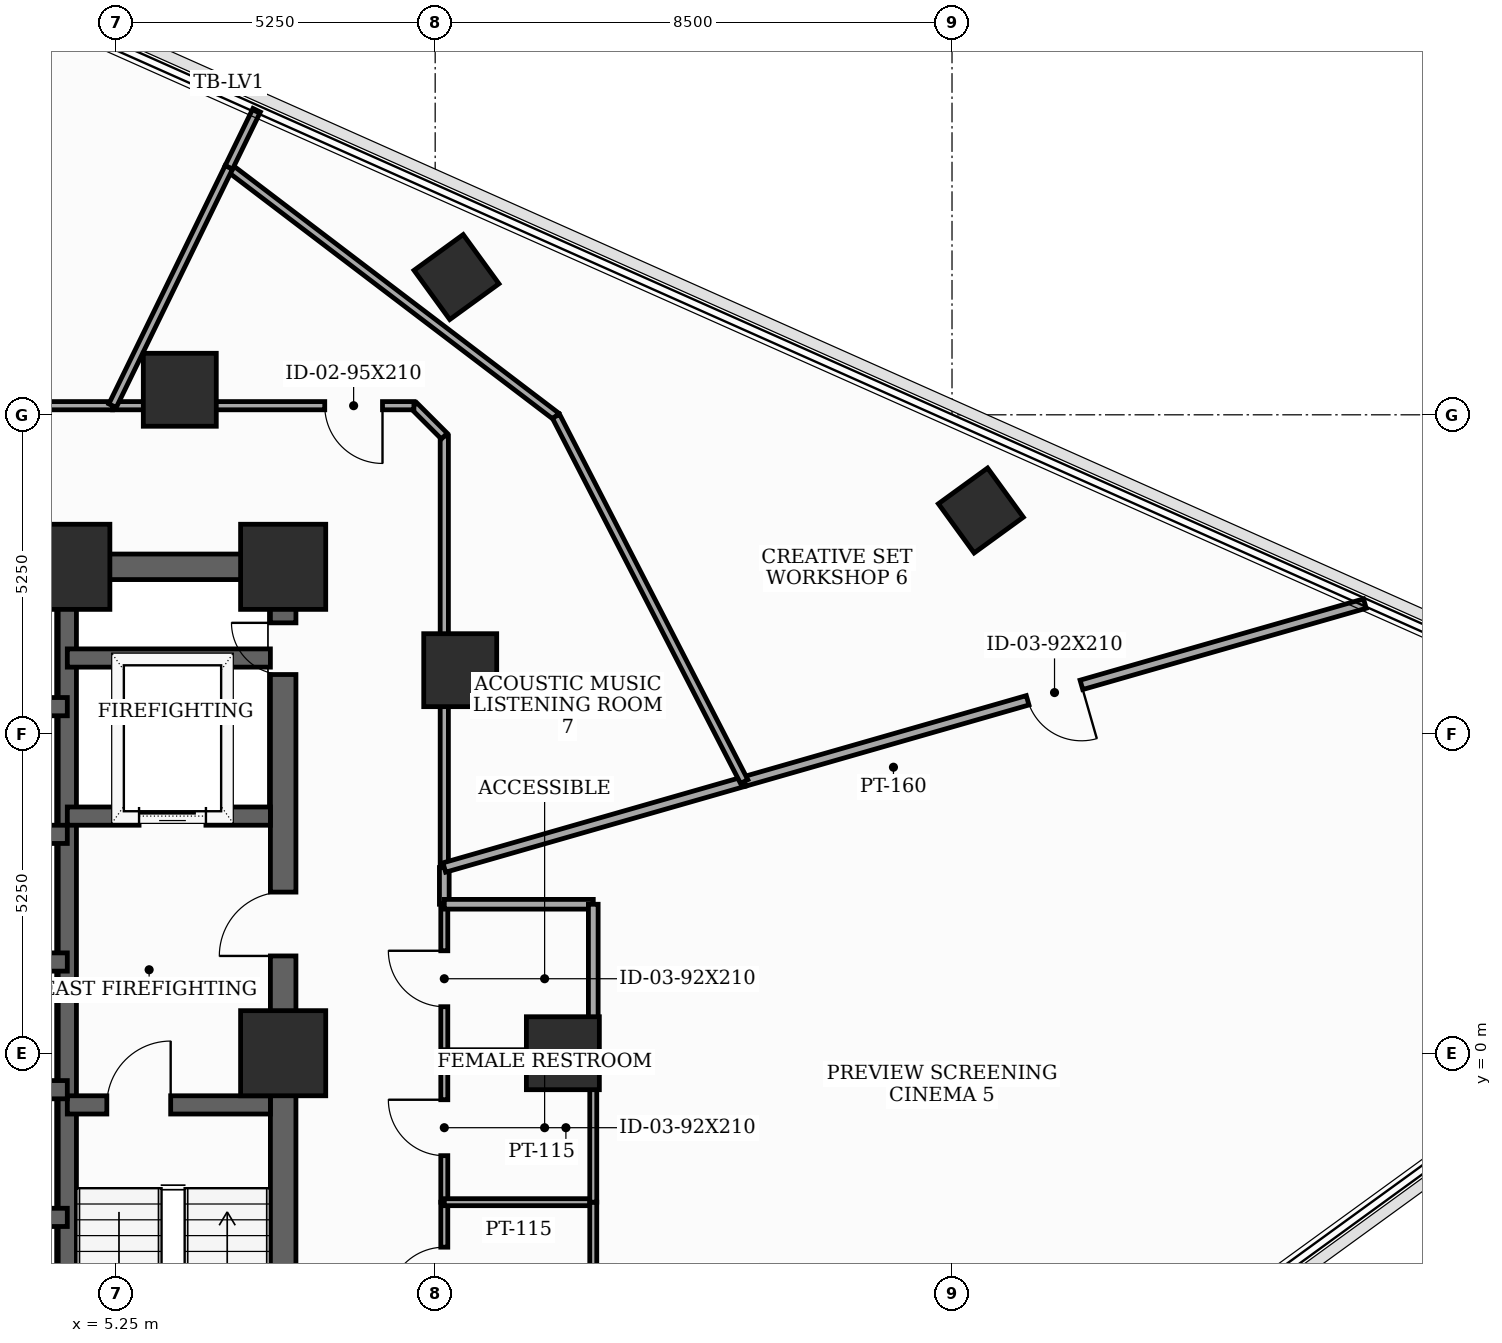
"""IFC4 building model, lengths in metres.
Left out: names, types, materials, properties, quantities, classifications, styles, units other than length and angle.
Written with IfcOpenShell. Run it as: python <this file> out.ifc"""

import sys

from ifc_helpers import new_model, si_unit, direction, frame, frame_2d, origin, origin_2d, place, context, subcontext, project, spatial, rectangle, extrude, element, fill, save


model = new_model("IFC4")
c1 = context("Model", 3, precision=1e-05, world=origin(), true_north=direction((0.0, 1.0)))
c2 = subcontext(c1, "Body", "Model", "MODEL_VIEW")
j1 = project(units=[si_unit("LENGTHUNIT", "METRE"), si_unit("PLANEANGLEUNIT", "RADIAN")], contexts=[c1])
p1 = place(None, origin())
s1 = spatial("IfcSite", under=j1, at=p1, CompositionType="ELEMENT")
p2 = place(p1, origin())
s2 = spatial("IfcBuilding", under=s1, at=p2, CompositionType="ELEMENT")
p3 = place(p2, frame((0.0, 0.0, 154.6)))
s3 = spatial("IfcBuildingStorey", under=s2, at=p3, CompositionType="ELEMENT", Elevation=154.6)
for number, where, z_axis, x_axis in (
    (1, (8.0, 0.0, 0.0), (0.0, 0.0, 1.0), (1.0, 0.0, 0.0)),
    (2, (8.0, 8.0, 0.0), (0.0, 0.0, 1.0), (1.0, 0.0, 0.0)),
    (3, (4.45, 8.0, 0.0), (0.0, 0.0, 1.0), (1.0, 0.0, 0.0)),
):
    element("IfcColumn", number, at=place(p3, frame(where, z_axis=z_axis, x_axis=x_axis)), inside=s3, PredefinedType="COLUMN", context=c2, shape_type="SweptSolid", body=[
        extrude(rectangle(XDim=1.4, YDim=1.4, at=origin_2d()), origin(), (0.0, 0.0, 1.0), 3.7),
    ])
for number, where, z_axis, x_axis in (
    (4, (12.6, 0.0, 0.0), (0.0, 0.0, 1.0), (1.0, 0.0, 0.0)),
    (5, (10.912, 6.3, 0.0), (0.0, 0.0, 1.0), (1.0, 0.0, 0.0)),
    (6, (6.3, 10.912, 0.0), (0.0, 0.0, 1.0), (1.0, 0.0, 0.0)),
):
    element("IfcColumn", number, at=place(p3, frame(where, z_axis=z_axis, x_axis=x_axis)), inside=s3, PredefinedType="COLUMN", context=c2, shape_type="SweptSolid", body=[
        extrude(rectangle(XDim=1.2, YDim=1.2, at=origin_2d()), origin(), (0.0, 0.0, 1.0), 3.7),
    ])
for number, where, z_axis, x_axis in (
    (7, (19.474, 8.926, 0.0), (0.0, 0.0, 1.0), (0.809, 0.588, 0.0)),
    (8, (10.85, 12.766, 0.0), (0.0, 0.0, 1.0), (0.809, 0.588, 0.0)),
):
    element("IfcColumn", number, at=place(p3, frame(where, z_axis=z_axis, x_axis=x_axis)), inside=s3, PredefinedType="COLUMN", context=c2, shape_type="SweptSolid", body=[
        extrude(rectangle(XDim=1.0, YDim=1.0, at=origin_2d()), origin(), (0.0, 0.0, 1.0), 3.7),
    ])
p4 = place(p3, frame((8.0, -8.0, 0.0), z_axis=(0.0, 0.0, 1.0), x_axis=(0.0, 1.0, 0.0)))
e9 = element("IfcWall", 9, at=p4, inside=s3, PredefinedType="SHEAR", context=c2, shape_type="SweptSolid", body=[
    extrude(rectangle(XDim=16.0, YDim=0.42, at=frame_2d((8.0, 0.0))), origin(), (0.0, 0.0, 1.0), 3.5),
])
p5 = place(p4, frame((9.6, 0.0, 0.0)))
e10 = element("IfcOpeningElement", 10, at=p5, cuts=e9, PredefinedType="OPENING", context=c2, shape_type="SweptSolid", body=[
    extrude(rectangle(XDim=1.05, YDim=2.15, at=frame_2d((0.525, 1.075))), frame((0.0, 0.22, 0.0), z_axis=(0.0, -1.0, 0.0), x_axis=(1.0, 0.0, 0.0)), (0.0, 0.0, 1.0), 0.44),
])
p6 = place(p4, frame((14.229, 0.0, 0.0)))
e11 = element("IfcOpeningElement", 11, at=p6, cuts=e9, PredefinedType="OPENING", context=c2, shape_type="SweptSolid", body=[
    extrude(rectangle(XDim=0.85, YDim=2.02, at=frame_2d((0.425, 1.01))), frame((0.0, 0.22, 0.0), z_axis=(0.0, -1.0, 0.0), x_axis=(1.0, 0.0, 0.0)), (0.0, 0.0, 1.0), 0.44),
])
p7 = place(p3, frame((-8.0, 8.0, 0.0), z_axis=(0.0, 0.0, 1.0), x_axis=(1.0, 0.0, 0.0)))
e12 = element("IfcWall", 12, at=p7, inside=s3, PredefinedType="SHEAR", context=c2, shape_type="SweptSolid", body=[
    extrude(rectangle(XDim=16.0, YDim=0.42, at=frame_2d((8.0, 0.0))), origin(), (0.0, 0.0, 1.0), 3.5),
])
p8 = place(p7, frame((7.1, 0.0, 0.0)))
e13 = element("IfcOpeningElement", 13, at=p8, cuts=e12, PredefinedType="OPENING", context=c2, shape_type="SweptSolid", body=[
    extrude(rectangle(XDim=1.8, YDim=2.15, at=frame_2d((0.9, 1.075))), frame((0.0, 0.22, 0.0), z_axis=(0.0, -1.0, 0.0), x_axis=(1.0, 0.0, 0.0)), (0.0, 0.0, 1.0), 0.44),
])
p9 = place(p3, frame((4.45, -7.79, 0.0), z_axis=(0.0, 0.0, 1.0), x_axis=(0.0, 1.0, 0.0)))
e14 = element("IfcWall", 14, at=p9, inside=s3, PredefinedType="SHEAR", context=c2, shape_type="SweptSolid", body=[
    extrude(rectangle(XDim=15.58, YDim=0.3, at=frame_2d((7.79, 0.0))), origin(), (0.0, 0.0, 1.0), 3.5),
])
p10 = place(p3, frame((4.45, -0.85, 0.0), z_axis=(0.0, 0.0, 1.0), x_axis=(1.0, 0.0, 0.0)))
e15 = element("IfcWall", 15, at=p10, inside=s3, PredefinedType="SHEAR", context=c2, shape_type="SweptSolid", body=[
    extrude(rectangle(XDim=3.34, YDim=0.3, at=frame_2d((1.67, 0.0))), origin(), (0.0, 0.0, 1.0), 3.5),
])
p11 = place(p10, frame((0.65, 0.0, 0.0)))
e16 = element("IfcOpeningElement", 16, at=p11, cuts=e15, PredefinedType="OPENING", context=c2, shape_type="SweptSolid", body=[
    extrude(rectangle(XDim=1.05, YDim=2.15, at=frame_2d((0.525, 1.075))), frame((0.0, 0.16, 0.0), z_axis=(0.0, -1.0, 0.0), x_axis=(1.0, 0.0, 0.0)), (0.0, 0.0, 1.0), 0.32),
])
p12 = place(p3, frame((4.45, 3.9, 0.0), z_axis=(0.0, 0.0, 1.0), x_axis=(1.0, 0.0, 0.0)))
e17 = element("IfcWall", 17, at=p12, inside=s3, PredefinedType="SHEAR", context=c2, shape_type="SweptSolid", body=[
    extrude(rectangle(XDim=3.34, YDim=0.3, at=frame_2d((1.67, 0.0))), origin(), (0.0, 0.0, 1.0), 3.5),
])
p13 = place(p12, frame((1.18, 0.0, 0.0)))
e18 = element("IfcOpeningElement", 18, at=p13, cuts=e17, PredefinedType="OPENING", context=c2, shape_type="SweptSolid", body=[
    extrude(rectangle(XDim=1.1, YDim=2.1, at=frame_2d((0.55, 1.05))), frame((0.0, 0.16, 0.0), z_axis=(0.0, -1.0, 0.0), x_axis=(1.0, 0.0, 0.0)), (0.0, 0.0, 1.0), 0.32),
])
p14 = place(p3, frame((4.45, 6.5, 0.0), z_axis=(0.0, 0.0, 1.0), x_axis=(1.0, 0.0, 0.0)))
e19 = element("IfcWall", 19, at=p14, inside=s3, PredefinedType="SHEAR", context=c2, shape_type="SweptSolid", body=[
    extrude(rectangle(XDim=3.34, YDim=0.3, at=frame_2d((1.67, 0.0))), origin(), (0.0, 0.0, 1.0), 3.5),
])
for number, where, z_axis, x_axis in (
    (20, (1.68, 1.5, 0.0), (0.0, 0.0, 1.0), (1.0, 0.0, 0.0)),
    (21, (1.68, 3.6, 0.0), (0.0, 0.0, 1.0), (1.0, 0.0, 0.0)),
    (22, (1.68, 5.7, 0.0), (0.0, 0.0, 1.0), (1.0, 0.0, 0.0)),
    (23, (1.68, -2.7, 0.0), (0.0, 0.0, 1.0), (1.0, 0.0, 0.0)),
    (24, (1.68, -0.6, 0.0), (0.0, 0.0, 1.0), (1.0, 0.0, 0.0)),
):
    element("IfcWall", number, at=place(p3, frame(where, z_axis=z_axis, x_axis=x_axis)), inside=s3, PredefinedType="SHEAR", context=c2, shape_type="SweptSolid", body=[
        extrude(rectangle(XDim=2.77, YDim=0.3, at=frame_2d((1.385, 0.0))), origin(), (0.0, 0.0, 1.0), 3.5),
    ])
p15 = place(p3, frame((10.65, -4.85, 0.0), z_axis=(0.0, 0.0, 1.0), x_axis=(0.0, 1.0, 0.0)))
e25 = element("IfcWall", 25, at=p15, inside=s3, PredefinedType="PARTITIONING", context=c2, shape_type="SweptSolid", body=[
    extrude(rectangle(XDim=2.4, YDim=0.115, at=frame_2d((1.2, 0.0))), origin(), (0.0, 0.0, 1.0), 3.5),
])
p16 = place(p15, frame((0.74, 0.0, 0.0)))
e26 = element("IfcOpeningElement", 26, at=p16, cuts=e25, PredefinedType="OPENING", context=c2, shape_type="SweptSolid", body=[
    extrude(rectangle(XDim=0.92, YDim=2.1, at=frame_2d((0.46, 1.05))), frame((0.0, 0.067, 0.0), z_axis=(0.0, -1.0, 0.0), x_axis=(1.0, 0.0, 0.0)), (0.0, 0.0, 1.0), 0.135),
])
p17 = place(p3, frame((10.65, -2.45, 0.0), z_axis=(0.0, 0.0, 1.0), x_axis=(0.0, 1.0, 0.0)))
e27 = element("IfcWall", 27, at=p17, inside=s3, PredefinedType="PARTITIONING", context=c2, shape_type="SweptSolid", body=[
    extrude(rectangle(XDim=2.45, YDim=0.115, at=frame_2d((1.225, 0.0))), origin(), (0.0, 0.0, 1.0), 2.885),
])
p18 = place(p17, frame((0.765, 0.0, 0.0)))
e28 = element("IfcOpeningElement", 28, at=p18, cuts=e27, PredefinedType="OPENING", context=c2, shape_type="SweptSolid", body=[
    extrude(rectangle(XDim=0.92, YDim=2.1, at=frame_2d((0.46, 1.05))), frame((0.0, 0.067, 0.0), z_axis=(0.0, -1.0, 0.0), x_axis=(1.0, 0.0, 0.0)), (0.0, 0.0, 1.0), 0.135),
])
p19 = place(p3, frame((10.65, 2.45, 0.0), z_axis=(0.0, 0.0, 1.0), x_axis=(0.0, 1.0, 0.0)))
e29 = element("IfcWall", 29, at=p19, inside=s3, PredefinedType="PARTITIONING", context=c2, shape_type="SweptSolid", body=[
    extrude(rectangle(XDim=0.604, YDim=0.16, at=frame_2d((0.302, 0.0))), origin(), (0.0, 0.0, 1.0), 3.5),
])
p20 = place(p3, frame((10.65, 0.0, 0.0), z_axis=(0.0, 0.0, 1.0), x_axis=(0.0, 1.0, 0.0)))
e30 = element("IfcWall", 30, at=p20, inside=s3, PredefinedType="PARTITIONING", context=c2, shape_type="SweptSolid", body=[
    extrude(rectangle(XDim=2.45, YDim=0.115, at=frame_2d((1.225, 0.0))), origin(), (0.0, 0.0, 1.0), 2.885),
])
p21 = place(p20, frame((0.765, 0.0, 0.0)))
e31 = element("IfcOpeningElement", 31, at=p21, cuts=e30, PredefinedType="OPENING", context=c2, shape_type="SweptSolid", body=[
    extrude(rectangle(XDim=0.92, YDim=2.1, at=frame_2d((0.46, 1.05))), frame((0.0, 0.067, 0.0), z_axis=(0.0, -1.0, 0.0), x_axis=(1.0, 0.0, 0.0)), (0.0, 0.0, 1.0), 0.135),
])
p22 = place(p3, frame((10.65, 3.054, 0.0), z_axis=(0.0, 0.0, 1.0), x_axis=(0.0, 1.0, 0.0)))
e32 = element("IfcWall", 32, at=p22, inside=s3, PredefinedType="PARTITIONING", context=c2, shape_type="SweptSolid", body=[
    extrude(rectangle(XDim=7.096, YDim=0.135, at=frame_2d((3.548, 0.0))), origin(), (0.0, 0.0, 1.0), 2.885),
])
p23 = place(p3, frame((10.65, 10.15, 0.0), z_axis=(0.0, 0.0, 1.0), x_axis=(-0.707106781187, 0.707106781187, 0.0)))
e33 = element("IfcWall", 33, at=p23, inside=s3, PredefinedType="PARTITIONING", context=c2, shape_type="SweptSolid", body=[
    extrude(rectangle(XDim=0.707, YDim=0.135, at=frame_2d((0.354, 0.0))), origin(), (0.0, 0.0, 1.0), 3.5),
])
p24 = place(p3, frame((10.15, 10.65, 0.0), z_axis=(0.0, 0.0, 1.0), x_axis=(-1.0, 0.0, 0.0)))
e34 = element("IfcWall", 34, at=p24, inside=s3, PredefinedType="PARTITIONING", context=c2, shape_type="SweptSolid", body=[
    extrude(rectangle(XDim=4.956, YDim=0.135, at=frame_2d((2.478, 0.0))), origin(), (0.0, 0.0, 1.0), 2.885),
])
p25 = place(p24, frame((0.516, 0.0, 0.0)))
e35 = element("IfcOpeningElement", 35, at=p25, cuts=e34, PredefinedType="OPENING", context=c2, shape_type="SweptSolid", body=[
    extrude(rectangle(XDim=0.95, YDim=2.1, at=frame_2d((0.475, 1.05))), frame((0.0, 0.077, 0.0), z_axis=(0.0, -1.0, 0.0), x_axis=(1.0, 0.0, 0.0)), (0.0, 0.0, 1.0), 0.155),
])
p26 = place(p3, frame((5.194, 10.65, 0.0), z_axis=(0.0, 0.0, 1.0), x_axis=(-1.0, 0.0, 0.0)))
e36 = element("IfcWall", 36, at=p26, inside=s3, PredefinedType="PARTITIONING", context=c2, shape_type="SweptSolid", body=[
    extrude(rectangle(XDim=11.343, YDim=0.135, at=frame_2d((5.671, 0.0))), origin(), (0.0, 0.0, 1.0), 2.885),
])
p27 = place(p26, frame((6.558, 0.0, 0.0)))
e37 = element("IfcOpeningElement", 37, at=p27, cuts=e36, PredefinedType="OPENING", context=c2, shape_type="SweptSolid", body=[
    extrude(rectangle(XDim=0.95, YDim=2.1, at=frame_2d((0.475, 1.05))), frame((0.0, 0.077, 0.0), z_axis=(0.0, -1.0, 0.0), x_axis=(1.0, 0.0, 0.0)), (0.0, 0.0, 1.0), 0.155),
])
p28 = place(p3, frame((13.1, -2.45, 0.0), z_axis=(0.0, 0.0, 1.0), x_axis=(-1.0, 0.0, 0.0)))
e38 = element("IfcWall", 38, at=p28, inside=s3, PredefinedType="PARTITIONING", context=c2, shape_type="SweptSolid", body=[
    extrude(rectangle(XDim=2.45, YDim=0.115, at=frame_2d((1.225, 0.0))), origin(), (0.0, 0.0, 1.0), 2.885),
])
p29 = place(p3, frame((13.1, -4.85, 0.0), z_axis=(0.0, 0.0, 1.0), x_axis=(0.0, 1.0, 0.0)))
e39 = element("IfcWall", 39, at=p29, inside=s3, PredefinedType="PARTITIONING", context=c2, shape_type="SweptSolid", body=[
    extrude(rectangle(XDim=2.4, YDim=0.115, at=frame_2d((1.2, 0.0))), origin(), (0.0, 0.0, 1.0), 3.5),
])
p30 = place(p3, frame((13.1, -2.45, 0.0), z_axis=(0.0, 0.0, 1.0), x_axis=(0.0, 1.0, 0.0)))
e40 = element("IfcWall", 40, at=p30, inside=s3, PredefinedType="PARTITIONING", context=c2, shape_type="SweptSolid", body=[
    extrude(rectangle(XDim=2.45, YDim=0.115, at=frame_2d((1.225, 0.0))), origin(), (0.0, 0.0, 1.0), 2.885),
])
p31 = place(p3, frame((13.1, 0.0, 0.0), z_axis=(0.0, 0.0, 1.0), x_axis=(-1.0, 0.0, 0.0)))
e41 = element("IfcWall", 41, at=p31, inside=s3, PredefinedType="PARTITIONING", context=c2, shape_type="SweptSolid", body=[
    extrude(rectangle(XDim=2.45, YDim=0.115, at=frame_2d((1.225, 0.0))), origin(), (0.0, 0.0, 1.0), 2.885),
])
p32 = place(p3, frame((10.65, 2.45, 0.0), z_axis=(0.0, 0.0, 1.0), x_axis=(1.0, 0.0, 0.0)))
e42 = element("IfcWall", 42, at=p32, inside=s3, PredefinedType="PARTITIONING", context=c2, shape_type="SweptSolid", body=[
    extrude(rectangle(XDim=2.45, YDim=0.16, at=frame_2d((1.225, 0.0))), origin(), (0.0, 0.0, 1.0), 2.885),
])
p33 = place(p3, frame((13.1, 2.45, 0.0), z_axis=(0.0, 0.0, 1.0), x_axis=(0.0, -1.0, 0.0)))
e43 = element("IfcWall", 43, at=p33, inside=s3, PredefinedType="PARTITIONING", context=c2, shape_type="SweptSolid", body=[
    extrude(rectangle(XDim=2.45, YDim=0.16, at=frame_2d((1.225, 0.0))), origin(), (0.0, 0.0, 1.0), 3.5),
])
p34 = place(p3, frame((25.79, 7.395, 0.0), z_axis=(0.0, 0.0, 1.0), x_axis=(-0.961256282332, -0.275656234607, 0.0)))
e44 = element("IfcWall", 44, at=p34, inside=s3, PredefinedType="PARTITIONING", context=c2, shape_type="SweptSolid", body=[
    extrude(rectangle(XDim=10.619, YDim=0.16, at=frame_2d((5.31, 0.0))), origin(), (0.0, 0.0, 1.0), 2.985),
])
p35 = place(p34, frame((4.85, 0.0, 0.0)))
e45 = element("IfcOpeningElement", 45, at=p35, cuts=e44, PredefinedType="OPENING", context=c2, shape_type="SweptSolid", body=[
    extrude(rectangle(XDim=0.92, YDim=2.1, at=frame_2d((0.46, 1.05))), frame((0.0, 0.09, 0.0), z_axis=(0.0, -1.0, 0.0), x_axis=(1.0, 0.0, 0.0)), (0.0, 0.0, 1.0), 0.18),
])
p36 = place(p3, frame((15.582, 4.468, 0.0), z_axis=(0.0, 0.0, 1.0), x_axis=(-0.961272163105, -0.275600849852, 0.0)))
e46 = element("IfcWall", 46, at=p36, inside=s3, PredefinedType="PARTITIONING", context=c2, shape_type="SweptSolid", body=[
    extrude(rectangle(XDim=5.131, YDim=0.16, at=frame_2d((2.565, 0.0))), origin(), (0.0, 0.0, 1.0), 2.885),
])
p37 = place(p3, frame((7.106, 14.569, 0.0), z_axis=(0.0, 0.0, 1.0), x_axis=(0.795990968219, -0.60530849863, 0.0)))
e47 = element("IfcWall", 47, at=p37, inside=s3, PredefinedType="PARTITIONING", context=c2, shape_type="SweptSolid", body=[
    extrude(rectangle(XDim=6.76, YDim=0.135, at=frame_2d((3.38, 0.0))), origin(), (0.0, 0.0, 1.0), 2.885),
])
p38 = place(p3, frame((12.487, 10.477, 0.0), z_axis=(0.0, 0.0, 1.0), x_axis=(0.457887389752, -0.889010201464, 0.0)))
e48 = element("IfcWall", 48, at=p38, inside=s3, PredefinedType="PARTITIONING", context=c2, shape_type="SweptSolid", body=[
    extrude(rectangle(XDim=6.759, YDim=0.135, at=frame_2d((3.38, 0.0))), origin(), (0.0, 0.0, 1.0), 2.885),
])
p39 = place(p3, frame((7.564, 15.51, 0.0), z_axis=(0.0, 0.0, 1.0), x_axis=(-0.438230528202, -0.898862616951, 0.0)))
e49 = element("IfcWall", 49, at=p39, inside=s3, PredefinedType="PARTITIONING", context=c2, shape_type="SweptSolid", body=[
    extrude(rectangle(XDim=1.046, YDim=0.135, at=frame_2d((0.523, 0.0))), origin(), (0.0, 0.0, 1.0), 2.985),
])
p40 = place(p3, frame((7.106, 14.569, 0.0), z_axis=(0.0, 0.0, 1.0), x_axis=(-0.43843576568, -0.898762526684, 0.0)))
e50 = element("IfcWall", 50, at=p40, inside=s3, PredefinedType="PARTITIONING", context=c2, shape_type="SweptSolid", body=[
    extrude(rectangle(XDim=4.361, YDim=0.135, at=frame_2d((2.18, 0.0))), origin(), (0.0, 0.0, 1.0), 2.885),
])
p41 = place(p5, origin())
e51 = element("IfcDoor", 51, at=p41, inside=s3, OperationType="SINGLE_SWING_LEFT", PredefinedType="DOOR", context=c2, shape_type="SweptSolid", body=[
    extrude(rectangle(XDim=1.05, YDim=2.15, at=frame_2d((0.525, 1.075))), frame((0.0, 0.025, 0.0), z_axis=(0.0, -1.0, 0.0), x_axis=(1.0, 0.0, 0.0)), (0.0, 0.0, 1.0), 0.05),
])
fill(e10, e51)
p42 = place(p6, origin())
e52 = element("IfcDoor", 52, at=p42, inside=s3, OperationType="SINGLE_SWING_RIGHT", PredefinedType="TRAPDOOR", context=c2, shape_type="SweptSolid", body=[
    extrude(rectangle(XDim=0.85, YDim=2.02, at=frame_2d((0.425, 1.01))), frame((0.0, 0.025, 0.0), z_axis=(0.0, -1.0, 0.0), x_axis=(1.0, 0.0, 0.0)), (0.0, 0.0, 1.0), 0.05),
])
fill(e11, e52)
p43 = place(p11, origin())
e53 = element("IfcDoor", 53, at=p43, inside=s3, OperationType="SINGLE_SWING_RIGHT", PredefinedType="DOOR", context=c2, shape_type="SweptSolid", body=[
    extrude(rectangle(XDim=1.05, YDim=2.15, at=frame_2d((0.525, 1.075))), frame((0.0, 0.025, 0.0), z_axis=(0.0, -1.0, 0.0), x_axis=(1.0, 0.0, 0.0)), (0.0, 0.0, 1.0), 0.05),
])
fill(e16, e53)
p44 = place(p13, origin())
e54 = element("IfcDoor", 54, at=p44, inside=s3, OperationType="SLIDING_TO_LEFT", PredefinedType="DOOR", context=c2, shape_type="SweptSolid", body=[
    extrude(rectangle(XDim=1.1, YDim=2.1, at=frame_2d((0.55, 1.05))), frame((0.0, 0.025, 0.0), z_axis=(0.0, -1.0, 0.0), x_axis=(1.0, 0.0, 0.0)), (0.0, 0.0, 1.0), 0.05),
])
fill(e18, e54)
p45 = place(p16, origin())
e55 = element("IfcDoor", 55, at=p45, inside=s3, OperationType="SINGLE_SWING_LEFT", PredefinedType="DOOR", context=c2, shape_type="SweptSolid", body=[
    extrude(rectangle(XDim=0.92, YDim=2.1, at=frame_2d((0.46, 1.05))), frame((0.0, 0.025, 0.0), z_axis=(0.0, -1.0, 0.0), x_axis=(1.0, 0.0, 0.0)), (0.0, 0.0, 1.0), 0.05),
])
fill(e26, e55)
p46 = place(p18, origin())
e56 = element("IfcDoor", 56, at=p46, inside=s3, OperationType="SINGLE_SWING_RIGHT", PredefinedType="DOOR", context=c2, shape_type="SweptSolid", body=[
    extrude(rectangle(XDim=0.92, YDim=2.1, at=frame_2d((0.46, 1.05))), frame((0.0, 0.025, 0.0), z_axis=(0.0, -1.0, 0.0), x_axis=(1.0, 0.0, 0.0)), (0.0, 0.0, 1.0), 0.05),
])
fill(e28, e56)
p47 = place(p21, origin())
e57 = element("IfcDoor", 57, at=p47, inside=s3, OperationType="SINGLE_SWING_RIGHT", PredefinedType="DOOR", context=c2, shape_type="SweptSolid", body=[
    extrude(rectangle(XDim=0.92, YDim=2.1, at=frame_2d((0.46, 1.05))), frame((0.0, 0.025, 0.0), z_axis=(0.0, -1.0, 0.0), x_axis=(1.0, 0.0, 0.0)), (0.0, 0.0, 1.0), 0.05),
])
fill(e31, e57)
p48 = place(p25, origin())
e58 = element("IfcDoor", 58, at=p48, inside=s3, OperationType="SINGLE_SWING_LEFT", PredefinedType="DOOR", context=c2, shape_type="SweptSolid", body=[
    extrude(rectangle(XDim=0.95, YDim=2.1, at=frame_2d((0.475, 1.05))), frame((0.0, 0.025, 0.0), z_axis=(0.0, -1.0, 0.0), x_axis=(1.0, 0.0, 0.0)), (0.0, 0.0, 1.0), 0.05),
])
fill(e35, e58)
p49 = place(p35, origin())
e59 = element("IfcDoor", 59, at=p49, inside=s3, OperationType="SINGLE_SWING_LEFT", PredefinedType="DOOR", context=c2, shape_type="SweptSolid", body=[
    extrude(rectangle(XDim=0.92, YDim=2.1, at=frame_2d((0.46, 1.05))), frame((0.0, 0.025, 0.0), z_axis=(0.0, -1.0, 0.0), x_axis=(1.0, 0.0, 0.0)), (0.0, 0.0, 1.0), 0.05),
])
fill(e45, e59)
save(model, sys.argv[1])
